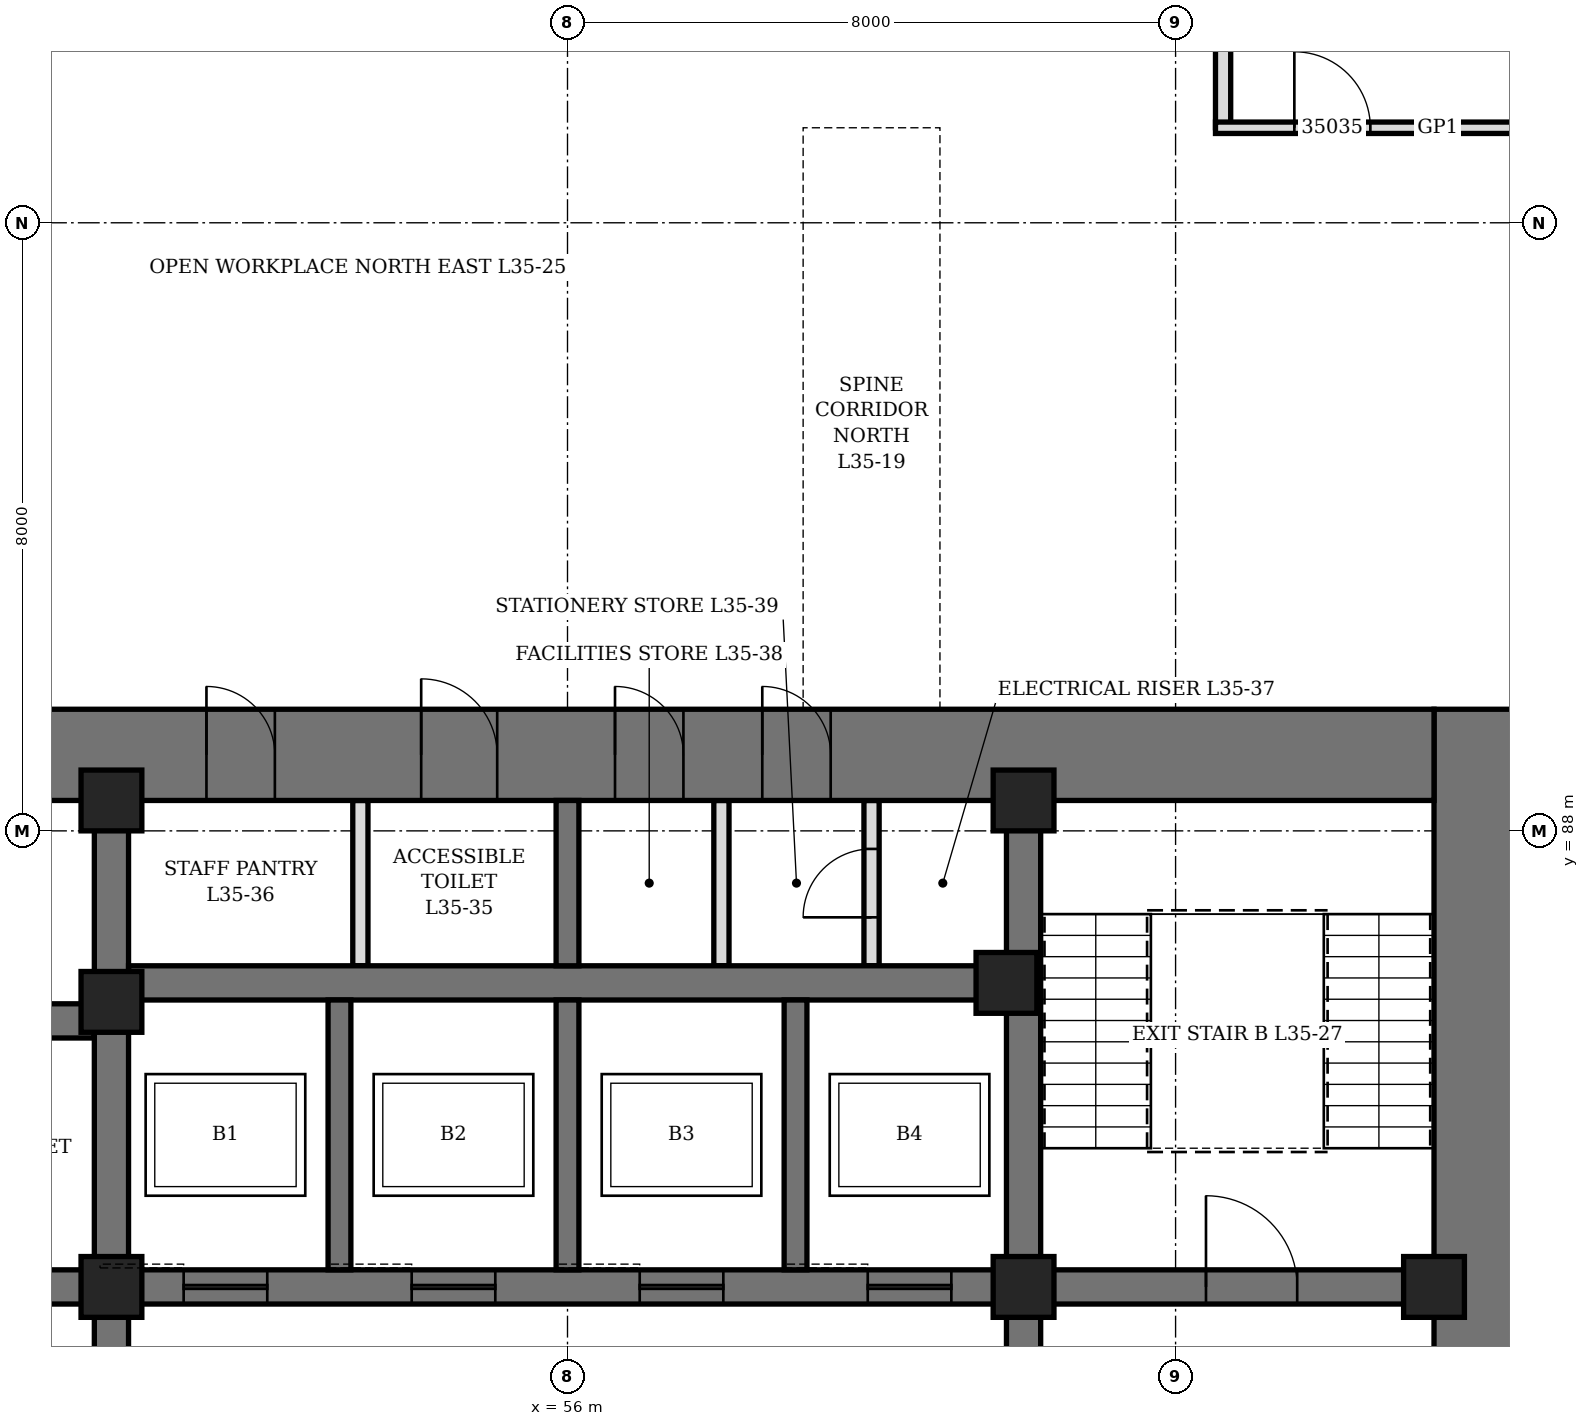
"""IFC4 building model, lengths in metres.
Left out: names, types, materials, properties, quantities, classifications, styles, units other than length and angle.
Written with IfcOpenShell. Run it as: python <this file> out.ifc"""

import sys

from ifc_helpers import new_model, si_unit, direction, frame, frame_2d, origin, origin_2d, place, context, subcontext, project, spatial, rectangle, hollow_rectangle, extrude, element, fill, save


model = new_model("IFC4")
c1 = context("Model", 3, precision=1e-05, world=origin(), true_north=direction((0.0, 1.0)))
c2 = subcontext(c1, "Body", "Model", "MODEL_VIEW")
j1 = project(units=[si_unit("LENGTHUNIT", "METRE"), si_unit("PLANEANGLEUNIT", "RADIAN")], contexts=[c1])
p1 = place(None, origin())
s1 = spatial("IfcSite", under=j1, at=p1, CompositionType="ELEMENT")
p2 = place(p1, origin())
s2 = spatial("IfcBuilding", under=s1, at=p2, CompositionType="ELEMENT")
p3 = place(p2, frame((0.0, 0.0, 158.5)))
s3 = spatial("IfcBuildingStorey", under=s2, at=p3, CompositionType="ELEMENT", Elevation=158.5)
p4 = place(p3, frame((68.0, 70.4, 0.0), z_axis=(0.0, 0.0, 1.0), x_axis=(0.0, 1.0, 0.0)))
e1 = element("IfcWall", 1, at=p4, inside=s3, PredefinedType="SHEAR", context=c2, shape_type="SweptSolid", body=[
    extrude(rectangle(XDim=19.2, YDim=1.2, at=frame_2d((9.6, 0.0))), origin(), (0.0, 0.0, 1.0), 4.2),
])
p5 = place(p4, frame((8.6, 0.0, 0.0)))
e2 = element("IfcOpeningElement", 2, at=p5, cuts=e1, PredefinedType="OPENING", context=c2, shape_type="SweptSolid", body=[
    extrude(rectangle(XDim=2.0, YDim=2.4, at=frame_2d((1.0, 1.2))), frame((0.0, 0.61, 0.0), z_axis=(0.0, -1.0, 0.0), x_axis=(1.0, 0.0, 0.0)), (0.0, 0.0, 1.0), 1.22),
])
p6 = place(p3, frame((44.6, 89.0, 0.0), z_axis=(0.0, 0.0, 1.0), x_axis=(1.0, 0.0, 0.0)))
e3 = element("IfcWall", 3, at=p6, inside=s3, PredefinedType="SHEAR", context=c2, shape_type="SweptSolid", body=[
    extrude(rectangle(XDim=22.8, YDim=1.2, at=frame_2d((11.4, 0.0))), origin(), (0.0, 0.0, 1.0), 4.2),
])
p7 = place(p6, frame((9.475, 0.0, 0.0)))
e4 = element("IfcOpeningElement", 4, at=p7, cuts=e3, PredefinedType="OPENING", context=c2, shape_type="SweptSolid", body=[
    extrude(rectangle(XDim=1.0, YDim=2.1, at=frame_2d((0.5, 1.05))), frame((0.0, 0.61, 0.0), z_axis=(0.0, -1.0, 0.0), x_axis=(1.0, 0.0, 0.0)), (0.0, 0.0, 1.0), 1.22),
])
p8 = place(p6, frame((6.65, 0.0, 0.0)))
e5 = element("IfcOpeningElement", 5, at=p8, cuts=e3, PredefinedType="OPENING", context=c2, shape_type="SweptSolid", body=[
    extrude(rectangle(XDim=0.9, YDim=2.1, at=frame_2d((0.45, 1.05))), frame((0.0, 0.61, 0.0), z_axis=(0.0, -1.0, 0.0), x_axis=(1.0, 0.0, 0.0)), (0.0, 0.0, 1.0), 1.22),
])
p9 = place(p6, frame((12.025, 0.0, 0.0)))
e6 = element("IfcOpeningElement", 6, at=p9, cuts=e3, PredefinedType="OPENING", context=c2, shape_type="SweptSolid", body=[
    extrude(rectangle(XDim=0.9, YDim=2.1, at=frame_2d((0.45, 1.05))), frame((0.0, 0.61, 0.0), z_axis=(0.0, -1.0, 0.0), x_axis=(1.0, 0.0, 0.0)), (0.0, 0.0, 1.0), 1.22),
])
p10 = place(p6, frame((13.962, 0.0, 0.0)))
e7 = element("IfcOpeningElement", 7, at=p10, cuts=e3, PredefinedType="OPENING", context=c2, shape_type="SweptSolid", body=[
    extrude(rectangle(XDim=0.9, YDim=2.1, at=frame_2d((0.45, 1.05))), frame((0.0, 0.61, 0.0), z_axis=(0.0, -1.0, 0.0), x_axis=(1.0, 0.0, 0.0)), (0.0, 0.0, 1.0), 1.22),
])
p11 = place(p3, frame((50.0, 71.6, 0.0), z_axis=(0.0, 0.0, 1.0), x_axis=(0.0, 1.0, 0.0)))
e8 = element("IfcWall", 8, at=p11, inside=s3, PredefinedType="SHEAR", context=c2, shape_type="SweptSolid", body=[
    extrude(rectangle(XDim=16.8, YDim=0.45, at=frame_2d((8.4, 0.0))), origin(), (0.0, 0.0, 1.0), 4.2),
])
p12 = place(p11, frame((7.5, 0.0, 0.0)))
e9 = element("IfcOpeningElement", 9, at=p12, cuts=e8, PredefinedType="OPENING", context=c2, shape_type="SweptSolid", body=[
    extrude(rectangle(XDim=1.8, YDim=2.4, at=frame_2d((0.9, 1.2))), frame((0.0, 0.235, 0.0), z_axis=(0.0, -1.0, 0.0), x_axis=(1.0, 0.0, 0.0)), (0.0, 0.0, 1.0), 0.47),
])
p13 = place(p3, frame((62.0, 71.6, 0.0), z_axis=(0.0, 0.0, 1.0), x_axis=(0.0, 1.0, 0.0)))
e10 = element("IfcWall", 10, at=p13, inside=s3, PredefinedType="SHEAR", context=c2, shape_type="SweptSolid", body=[
    extrude(rectangle(XDim=16.8, YDim=0.45, at=frame_2d((8.4, 0.0))), origin(), (0.0, 0.0, 1.0), 4.2),
])
p14 = place(p13, frame((7.5, 0.0, 0.0)))
e11 = element("IfcOpeningElement", 11, at=p14, cuts=e10, PredefinedType="OPENING", context=c2, shape_type="SweptSolid", body=[
    extrude(rectangle(XDim=1.8, YDim=2.4, at=frame_2d((0.9, 1.2))), frame((0.0, 0.235, 0.0), z_axis=(0.0, -1.0, 0.0), x_axis=(1.0, 0.0, 0.0)), (0.0, 0.0, 1.0), 0.47),
])
p15 = place(p3, frame((44.6, 82.0, 0.0), z_axis=(0.0, 0.0, 1.0), x_axis=(1.0, 0.0, 0.0)))
e12 = element("IfcWall", 12, at=p15, inside=s3, PredefinedType="SHEAR", context=c2, shape_type="SweptSolid", body=[
    extrude(rectangle(XDim=5.175, YDim=0.45, at=frame_2d((2.587, 0.0))), origin(), (0.0, 0.0, 1.0), 4.2),
])
p16 = place(p15, frame((0.7, 0.0, 0.0)))
e13 = element("IfcOpeningElement", 13, at=p16, cuts=e12, PredefinedType="OPENING", context=c2, shape_type="SweptSolid", body=[
    extrude(rectangle(XDim=0.9, YDim=2.1, at=frame_2d((0.45, 1.05))), frame((0.0, 0.235, 0.0), z_axis=(0.0, -1.0, 0.0), x_axis=(1.0, 0.0, 0.0)), (0.0, 0.0, 1.0), 0.47),
])
p17 = place(p3, frame((44.6, 85.5, 0.0), z_axis=(0.0, 0.0, 1.0), x_axis=(1.0, 0.0, 0.0)))
e14 = element("IfcWall", 14, at=p17, inside=s3, PredefinedType="SHEAR", context=c2, shape_type="SweptSolid", body=[
    extrude(rectangle(XDim=5.175, YDim=0.45, at=frame_2d((2.587, 0.0))), origin(), (0.0, 0.0, 1.0), 4.2),
])
p18 = place(p17, frame((0.7, 0.0, 0.0)))
e15 = element("IfcOpeningElement", 15, at=p18, cuts=e14, PredefinedType="OPENING", context=c2, shape_type="SweptSolid", body=[
    extrude(rectangle(XDim=0.9, YDim=2.1, at=frame_2d((0.45, 1.05))), frame((0.0, 0.235, 0.0), z_axis=(0.0, -1.0, 0.0), x_axis=(1.0, 0.0, 0.0)), (0.0, 0.0, 1.0), 0.47),
])
p19 = place(p3, frame((62.225, 82.0, 0.0), z_axis=(0.0, 0.0, 1.0), x_axis=(1.0, 0.0, 0.0)))
e16 = element("IfcWall", 16, at=p19, inside=s3, PredefinedType="SHEAR", context=c2, shape_type="SweptSolid", body=[
    extrude(rectangle(XDim=5.175, YDim=0.45, at=frame_2d((2.587, 0.0))), origin(), (0.0, 0.0, 1.0), 4.2),
])
p20 = place(p19, frame((2.175, 0.0, 0.0)))
e17 = element("IfcOpeningElement", 17, at=p20, cuts=e16, PredefinedType="OPENING", context=c2, shape_type="SweptSolid", body=[
    extrude(rectangle(XDim=1.2, YDim=2.1, at=frame_2d((0.6, 1.05))), frame((0.0, 0.235, 0.0), z_axis=(0.0, -1.0, 0.0), x_axis=(1.0, 0.0, 0.0)), (0.0, 0.0, 1.0), 0.47),
])
p21 = place(p3, frame((50.225, 82.0, 0.0), z_axis=(0.0, 0.0, 1.0), x_axis=(1.0, 0.0, 0.0)))
e18 = element("IfcWall", 18, at=p21, inside=s3, PredefinedType="SHEAR", context=c2, shape_type="SweptSolid", body=[
    extrude(rectangle(XDim=11.55, YDim=0.45, at=frame_2d((5.775, 0.0))), origin(), (0.0, 0.0, 1.0), 4.2),
])
p22 = place(p21, frame((0.725, 0.0, 0.0)))
e19 = element("IfcOpeningElement", 19, at=p22, cuts=e18, PredefinedType="OPENING", context=c2, shape_type="SweptSolid", body=[
    extrude(rectangle(XDim=1.1, YDim=2.2, at=frame_2d((0.55, 1.1))), frame((0.0, 0.235, 0.0), z_axis=(0.0, -1.0, 0.0), x_axis=(1.0, 0.0, 0.0)), (0.0, 0.0, 1.0), 0.47),
])
p23 = place(p21, frame((3.725, 0.0, 0.0)))
e20 = element("IfcOpeningElement", 20, at=p23, cuts=e18, PredefinedType="OPENING", context=c2, shape_type="SweptSolid", body=[
    extrude(rectangle(XDim=1.1, YDim=2.2, at=frame_2d((0.55, 1.1))), frame((0.0, 0.235, 0.0), z_axis=(0.0, -1.0, 0.0), x_axis=(1.0, 0.0, 0.0)), (0.0, 0.0, 1.0), 0.47),
])
p24 = place(p21, frame((6.725, 0.0, 0.0)))
e21 = element("IfcOpeningElement", 21, at=p24, cuts=e18, PredefinedType="OPENING", context=c2, shape_type="SweptSolid", body=[
    extrude(rectangle(XDim=1.1, YDim=2.2, at=frame_2d((0.55, 1.1))), frame((0.0, 0.235, 0.0), z_axis=(0.0, -1.0, 0.0), x_axis=(1.0, 0.0, 0.0)), (0.0, 0.0, 1.0), 0.47),
])
p25 = place(p21, frame((9.725, 0.0, 0.0)))
e22 = element("IfcOpeningElement", 22, at=p25, cuts=e18, PredefinedType="OPENING", context=c2, shape_type="SweptSolid", body=[
    extrude(rectangle(XDim=1.1, YDim=2.2, at=frame_2d((0.55, 1.1))), frame((0.0, 0.235, 0.0), z_axis=(0.0, -1.0, 0.0), x_axis=(1.0, 0.0, 0.0)), (0.0, 0.0, 1.0), 0.47),
])
p26 = place(p3, frame((50.225, 86.0, 0.0), z_axis=(0.0, 0.0, 1.0), x_axis=(1.0, 0.0, 0.0)))
e23 = element("IfcWall", 23, at=p26, inside=s3, PredefinedType="SHEAR", context=c2, shape_type="SweptSolid", body=[
    extrude(rectangle(XDim=11.55, YDim=0.45, at=frame_2d((5.775, 0.0))), origin(), (0.0, 0.0, 1.0), 4.2),
])
for number, where, z_axis, x_axis in (
    (24, (53.0, 82.225, 0.0), (0.0, 0.0, 1.0), (0.0, 1.0, 0.0)),
    (25, (56.0, 82.225, 0.0), (0.0, 0.0, 1.0), (0.0, 1.0, 0.0)),
    (26, (59.0, 82.225, 0.0), (0.0, 0.0, 1.0), (0.0, 1.0, 0.0)),
):
    element("IfcWall", number, at=place(p3, frame(where, z_axis=z_axis, x_axis=x_axis)), inside=s3, PredefinedType="SHEAR", context=c2, shape_type="SweptSolid", body=[
        extrude(rectangle(XDim=3.55, YDim=0.3, at=frame_2d((1.775, 0.0))), origin(), (0.0, 0.0, 1.0), 4.2),
    ])
p27 = place(p3, frame((56.0, 86.225, 0.0), z_axis=(0.0, 0.0, 1.0), x_axis=(0.0, 1.0, 0.0)))
e27 = element("IfcWall", 27, at=p27, inside=s3, PredefinedType="SHEAR", context=c2, shape_type="SweptSolid", body=[
    extrude(rectangle(XDim=2.175, YDim=0.3, at=frame_2d((1.087, 0.0))), origin(), (0.0, 0.0, 1.0), 4.2),
])
for number, where, z_axis, x_axis in (
    (28, (50.0, 82.0, 0.0), (0.0, 0.0, 1.0), (1.0, 0.0, 0.0)),
    (29, (50.0, 85.75, 0.0), (0.0, 0.0, 1.0), (1.0, 0.0, 0.0)),
    (30, (50.0, 88.4, 0.0), (0.0, 0.0, 1.0), (1.0, 0.0, 0.0)),
    (31, (61.775, 86.0, 0.0), (0.0, 0.0, 1.0), (1.0, 0.0, 0.0)),
    (32, (62.0, 82.0, 0.0), (0.0, 0.0, 1.0), (1.0, 0.0, 0.0)),
    (33, (62.0, 88.4, 0.0), (0.0, 0.0, 1.0), (1.0, 0.0, 0.0)),
    (34, (67.4, 82.0, 0.0), (0.0, 0.0, 1.0), (1.0, 0.0, 0.0)),
):
    element("IfcColumn", number, at=place(p3, frame(where, z_axis=z_axis, x_axis=x_axis)), inside=s3, PredefinedType="COLUMN", context=c2, shape_type="SweptSolid", body=[
        extrude(hollow_rectangle(XDim=0.8, YDim=0.8, WallThickness=0.1, at=origin_2d()), origin(), (0.0, 0.0, 1.0), 4.2),
    ])
p28 = place(p3, frame((53.275, 86.225, 0.0), z_axis=(0.0, 0.0, 1.0), x_axis=(0.0, 1.0, 0.0)))
e35 = element("IfcWall", 35, at=p28, inside=s3, PredefinedType="PARTITIONING", context=c2, shape_type="SweptSolid", body=[
    extrude(rectangle(XDim=2.175, YDim=0.2, at=frame_2d((1.087, 0.0))), origin(), (0.0, 0.0, 1.0), 4.04),
])
p29 = place(p3, frame((60.0, 86.225, 0.0), z_axis=(0.0, 0.0, 1.0), x_axis=(0.0, 1.0, 0.0)))
e36 = element("IfcWall", 36, at=p29, inside=s3, PredefinedType="PARTITIONING", context=c2, shape_type="SweptSolid", body=[
    extrude(rectangle(XDim=2.175, YDim=0.2, at=frame_2d((1.087, 0.0))), origin(), (0.0, 0.0, 1.0), 4.04),
])
p30 = place(p29, frame((0.637, 0.0, 0.0)))
e37 = element("IfcOpeningElement", 37, at=p30, cuts=e36, PredefinedType="OPENING", context=c2, shape_type="SweptSolid", body=[
    extrude(rectangle(XDim=0.9, YDim=2.1, at=frame_2d((0.45, 1.05))), frame((0.0, 0.11, 0.0), z_axis=(0.0, -1.0, 0.0), x_axis=(1.0, 0.0, 0.0)), (0.0, 0.0, 1.0), 0.22),
])
p31 = place(p3, frame((58.025, 86.225, 0.0), z_axis=(0.0, 0.0, 1.0), x_axis=(0.0, 1.0, 0.0)))
e38 = element("IfcWall", 38, at=p31, inside=s3, PredefinedType="PARTITIONING", context=c2, shape_type="SweptSolid", body=[
    extrude(rectangle(XDim=2.175, YDim=0.2, at=frame_2d((1.087, 0.0))), origin(), (0.0, 0.0, 1.0), 4.04),
])
p32 = place(p3, frame((64.625, 97.25, 0.0), z_axis=(0.0, 0.0, 1.0), x_axis=(0.0, 1.0, 0.0)))
e39 = element("IfcWall", 39, at=p32, inside=s3, PredefinedType="PARTITIONING", context=c2, shape_type="SweptSolid", body=[
    extrude(rectangle(XDim=4.8, YDim=0.2, at=frame_2d((2.4, 0.0))), origin(), (0.0, 0.0, 1.0), 3.278),
])
p33 = place(p3, frame((64.525, 97.25, 0.0), z_axis=(0.0, 0.0, 1.0), x_axis=(1.0, 0.0, 0.0)))
e40 = element("IfcWall", 40, at=p33, inside=s3, PredefinedType="PARTITIONING", context=c2, shape_type="SweptSolid", body=[
    extrude(rectangle(XDim=5.85, YDim=0.15, at=frame_2d((2.925, 0.0))), origin(), (0.0, 0.0, 1.0), 4.04),
])
p34 = place(p33, frame((1.038, 0.0, 0.0)))
e41 = element("IfcOpeningElement", 41, at=p34, cuts=e40, PredefinedType="OPENING", context=c2, shape_type="SweptSolid", body=[
    extrude(rectangle(XDim=1.0, YDim=2.1, at=frame_2d((0.5, 1.05))), frame((0.0, 0.085, 0.0), z_axis=(0.0, -1.0, 0.0), x_axis=(1.0, 0.0, 0.0)), (0.0, 0.0, 1.0), 0.17),
])
p35 = place(p7, origin())
e42 = element("IfcDoor", 42, at=p35, inside=s3, OperationType="SINGLE_SWING_LEFT", PredefinedType="DOOR", context=c2, shape_type="SweptSolid", body=[
    extrude(rectangle(XDim=1.0, YDim=2.1, at=frame_2d((0.5, 1.05))), frame((0.0, 0.35, 0.0), z_axis=(0.0, -1.0, 0.0), x_axis=(1.0, 0.0, 0.0)), (0.0, 0.0, 1.0), 0.7),
])
fill(e4, e42)
p36 = place(p8, origin())
e43 = element("IfcDoor", 43, at=p36, inside=s3, OperationType="SINGLE_SWING_LEFT", PredefinedType="DOOR", context=c2, shape_type="SweptSolid", body=[
    extrude(rectangle(XDim=0.9, YDim=2.1, at=frame_2d((0.45, 1.05))), frame((0.0, 0.35, 0.0), z_axis=(0.0, -1.0, 0.0), x_axis=(1.0, 0.0, 0.0)), (0.0, 0.0, 1.0), 0.7),
])
fill(e5, e43)
p37 = place(p9, origin())
e44 = element("IfcDoor", 44, at=p37, inside=s3, OperationType="SINGLE_SWING_LEFT", PredefinedType="DOOR", context=c2, shape_type="SweptSolid", body=[
    extrude(rectangle(XDim=0.9, YDim=2.1, at=frame_2d((0.45, 1.05))), frame((0.0, 0.35, 0.0), z_axis=(0.0, -1.0, 0.0), x_axis=(1.0, 0.0, 0.0)), (0.0, 0.0, 1.0), 0.7),
])
fill(e6, e44)
p38 = place(p10, origin())
e45 = element("IfcDoor", 45, at=p38, inside=s3, OperationType="SINGLE_SWING_LEFT", PredefinedType="DOOR", context=c2, shape_type="SweptSolid", body=[
    extrude(rectangle(XDim=0.9, YDim=2.1, at=frame_2d((0.45, 1.05))), frame((0.0, 0.35, 0.0), z_axis=(0.0, -1.0, 0.0), x_axis=(1.0, 0.0, 0.0)), (0.0, 0.0, 1.0), 0.7),
])
fill(e7, e45)
p39 = place(p30, origin())
e46 = element("IfcDoor", 46, at=p39, inside=s3, OperationType="SINGLE_SWING_LEFT", PredefinedType="DOOR", context=c2, shape_type="SweptSolid", body=[
    extrude(rectangle(XDim=0.9, YDim=2.1, at=frame_2d((0.45, 1.05))), frame((0.0, 0.1, 0.0), z_axis=(0.0, -1.0, 0.0), x_axis=(1.0, 0.0, 0.0)), (0.0, 0.0, 1.0), 0.199),
])
fill(e37, e46)
p40 = place(p20, origin())
e47 = element("IfcDoor", 47, at=p40, inside=s3, OperationType="SINGLE_SWING_LEFT", PredefinedType="DOOR", context=c2, shape_type="SweptSolid", body=[
    extrude(rectangle(XDim=1.2, YDim=2.1, at=frame_2d((0.6, 1.05))), frame((0.0, 0.225, 0.0), z_axis=(0.0, -1.0, 0.0), x_axis=(1.0, 0.0, 0.0)), (0.0, 0.0, 1.0), 0.449),
])
fill(e17, e47)
p41 = place(p22, origin())
e48 = element("IfcDoor", 48, at=p41, inside=s3, OperationType="SLIDING_TO_LEFT", PredefinedType="DOOR", context=c2, shape_type="SweptSolid", body=[
    extrude(rectangle(XDim=1.1, YDim=2.2, at=frame_2d((0.55, 1.1))), frame((0.0, 0.225, 0.0), z_axis=(0.0, -1.0, 0.0), x_axis=(1.0, 0.0, 0.0)), (0.0, 0.0, 1.0), 0.449),
])
fill(e19, e48)
p42 = place(p23, origin())
e49 = element("IfcDoor", 49, at=p42, inside=s3, OperationType="SLIDING_TO_LEFT", PredefinedType="DOOR", context=c2, shape_type="SweptSolid", body=[
    extrude(rectangle(XDim=1.1, YDim=2.2, at=frame_2d((0.55, 1.1))), frame((0.0, 0.225, 0.0), z_axis=(0.0, -1.0, 0.0), x_axis=(1.0, 0.0, 0.0)), (0.0, 0.0, 1.0), 0.449),
])
fill(e20, e49)
p43 = place(p24, origin())
e50 = element("IfcDoor", 50, at=p43, inside=s3, OperationType="SLIDING_TO_LEFT", PredefinedType="DOOR", context=c2, shape_type="SweptSolid", body=[
    extrude(rectangle(XDim=1.1, YDim=2.2, at=frame_2d((0.55, 1.1))), frame((0.0, 0.225, 0.0), z_axis=(0.0, -1.0, 0.0), x_axis=(1.0, 0.0, 0.0)), (0.0, 0.0, 1.0), 0.449),
])
fill(e21, e50)
p44 = place(p25, origin())
e51 = element("IfcDoor", 51, at=p44, inside=s3, OperationType="SLIDING_TO_LEFT", PredefinedType="DOOR", context=c2, shape_type="SweptSolid", body=[
    extrude(rectangle(XDim=1.1, YDim=2.2, at=frame_2d((0.55, 1.1))), frame((0.0, 0.225, 0.0), z_axis=(0.0, -1.0, 0.0), x_axis=(1.0, 0.0, 0.0)), (0.0, 0.0, 1.0), 0.449),
])
fill(e22, e51)
p45 = place(p34, origin())
e52 = element("IfcDoor", 52, at=p45, inside=s3, OperationType="SINGLE_SWING_LEFT", PredefinedType="DOOR", context=c2, shape_type="SweptSolid", body=[
    extrude(rectangle(XDim=1.0, YDim=2.1, at=frame_2d((0.5, 1.05))), frame((0.0, 0.075, 0.0), z_axis=(0.0, -1.0, 0.0), x_axis=(1.0, 0.0, 0.0)), (0.0, 0.0, 1.0), 0.149),
])
fill(e41, e52)
save(model, sys.argv[1])
